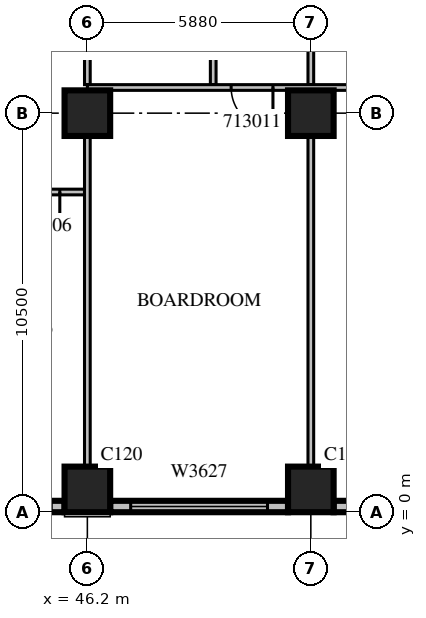
"""IFC4 building model, lengths in metres.
Left out: names, types, materials, properties, quantities, classifications, styles, units other than length and angle.
Written with IfcOpenShell. Run it as: python <this file> out.ifc"""

import sys

from ifc_helpers import new_model, si_unit, direction, frame, frame_2d, origin, origin_2d, place, context, subcontext, project, spatial, rectangle, extrude, source, transform, mapped, element, fill, save


model = new_model("IFC4")
c1 = context("Model", 3, precision=1e-05, world=origin(), true_north=direction((0.0, 1.0)))
c2 = subcontext(c1, "Body", "Model", "MODEL_VIEW")
j1 = project(units=[si_unit("LENGTHUNIT", "METRE"), si_unit("PLANEANGLEUNIT", "RADIAN")], contexts=[c1])
p1 = place(None, origin())
s1 = spatial("IfcSite", under=j1, at=p1, CompositionType="ELEMENT")
p2 = place(p1, origin())
s2 = spatial("IfcBuilding", under=s1, at=p2, CompositionType="ELEMENT")
p3 = place(p2, frame((0.0, 0.0, 65.7)))
s3 = spatial("IfcBuildingStorey", under=s2, at=p3, CompositionType="ELEMENT", Elevation=65.7)
m1 = source(origin(), c2, "Body", "SweptSolid", [
    extrude(rectangle(XDim=1.2, YDim=1.2, at=origin_2d()), origin(), (0.0, 0.0, 1.0), 4.2),
])
for number, where, z_axis, x_axis in (
    (1, (46.2, 0.6, 0.0), (0.0, 0.0, 1.0), (1.0, 0.0, 0.0)),
    (2, (52.08, 0.6, 0.0), (0.0, 0.0, 1.0), (1.0, 0.0, 0.0)),
    (3, (46.2, 10.5, 0.0), (0.0, 0.0, 1.0), (1.0, 0.0, 0.0)),
    (4, (52.08, 10.5, 0.0), (0.0, 0.0, 1.0), (1.0, 0.0, 0.0)),
):
    element("IfcColumn", number, at=place(p3, frame(where, z_axis=z_axis, x_axis=x_axis)), inside=s3, PredefinedType="COLUMN", context=c2, shape_type="MappedRepresentation", body=[
        mapped(m1, transform((0.0, 0.0, 0.0), scale=1.0)),
    ])
m2 = source(origin(), c2, "Body", "SweptSolid", [
    extrude(rectangle(XDim=1.6, YDim=0.3, at=frame_2d((0.8, 0.0))), origin(), (0.0, 0.0, 1.0), 3.8),
])
p4 = place(p3, frame((44.0, 0.15, 0.0), z_axis=(0.0, 0.0, 1.0), x_axis=(1.0, 0.0, 0.0)))
e5 = element("IfcWall", 5, at=p4, inside=s3, PredefinedType="STANDARD", context=c2, shape_type="MappedRepresentation", body=[
    mapped(m2, transform((0.0, 0.0, 0.0), scale=1.0)),
])
m3 = source(origin(), c2, "Body", "SweptSolid", [
    extrude(rectangle(XDim=0.9, YDim=2.7, at=frame_2d((0.45, 1.35))), frame((0.0, 0.16, 0.0), z_axis=(0.0, -1.0, 0.0), x_axis=(1.0, 0.0, 0.0)), (0.0, 0.0, 1.0), 0.32),
])
p5 = place(p4, frame((0.35, 0.0, 0.6)))
e6 = element("IfcOpeningElement", 6, at=p5, cuts=e5, PredefinedType="OPENING", context=c2, shape_type="MappedRepresentation", body=[
    mapped(m3, transform((0.0, 0.0, 0.0), scale=1.0)),
])
m4 = source(origin(), c2, "Body", "SweptSolid", [
    extrude(rectangle(XDim=4.68, YDim=0.3, at=frame_2d((2.34, 0.0))), origin(), (0.0, 0.0, 1.0), 3.8),
])
p6 = place(p3, frame((46.8, 0.15, 0.0), z_axis=(0.0, 0.0, 1.0), x_axis=(1.0, 0.0, 0.0)))
e7 = element("IfcWall", 7, at=p6, inside=s3, PredefinedType="STANDARD", context=c2, shape_type="MappedRepresentation", body=[
    mapped(m4, transform((0.0, 0.0, 0.0), scale=1.0)),
])
m5 = source(origin(), c2, "Body", "SweptSolid", [
    extrude(rectangle(XDim=3.6, YDim=2.7, at=frame_2d((1.8, 1.35))), frame((0.0, 0.16, 0.0), z_axis=(0.0, -1.0, 0.0), x_axis=(1.0, 0.0, 0.0)), (0.0, 0.0, 1.0), 0.32),
])
p7 = place(p6, frame((0.54, 0.0, 0.6)))
e8 = element("IfcOpeningElement", 8, at=p7, cuts=e7, PredefinedType="OPENING", context=c2, shape_type="MappedRepresentation", body=[
    mapped(m5, transform((0.0, 0.0, 0.0), scale=1.0)),
])
p8 = place(p3, frame((52.68, 0.15, 0.0), z_axis=(0.0, 0.0, 1.0), x_axis=(1.0, 0.0, 0.0)))
e9 = element("IfcWall", 9, at=p8, inside=s3, PredefinedType="STANDARD", context=c2, shape_type="MappedRepresentation", body=[
    mapped(m4, transform((0.0, 0.0, 0.0), scale=1.0)),
])
p9 = place(p8, frame((0.54, 0.0, 0.6)))
e10 = element("IfcOpeningElement", 10, at=p9, cuts=e9, PredefinedType="OPENING", context=c2, shape_type="MappedRepresentation", body=[
    mapped(m5, transform((0.0, 0.0, 0.0), scale=1.0)),
])
m6 = source(origin(), c2, "Body", "SweptSolid", [
    extrude(rectangle(XDim=2.2, YDim=0.15, at=frame_2d((1.1, 0.0))), origin(), (0.0, 0.0, 1.0), 3.8),
])
p10 = place(p3, frame((46.125, 8.425, 0.0), z_axis=(0.0, 0.0, 1.0), x_axis=(-1.0, 0.0, 0.0)))
e11 = element("IfcWall", 11, at=p10, inside=s3, PredefinedType="PARTITIONING", context=c2, shape_type="MappedRepresentation", body=[
    mapped(m6, transform((0.0, 0.0, 0.0), scale=1.0)),
])
m7 = source(origin(), c2, "Body", "SweptSolid", [
    extrude(rectangle(XDim=0.9, YDim=2.1, at=frame_2d((0.45, 1.05))), frame((0.0, 0.085, 0.0), z_axis=(0.0, -1.0, 0.0), x_axis=(1.0, 0.0, 0.0)), (0.0, 0.0, 1.0), 0.17),
])
p11 = place(p10, frame((0.65, 0.0, 0.0)))
e12 = element("IfcOpeningElement", 12, at=p11, cuts=e11, PredefinedType="OPENING", context=c2, shape_type="MappedRepresentation", body=[
    mapped(m7, transform((0.0, 0.0, 0.0), scale=1.0)),
])
m8 = source(origin(), c2, "Body", "SweptSolid", [
    extrude(rectangle(XDim=3.75, YDim=0.15, at=frame_2d((1.875, 0.0))), origin(), (0.0, 0.0, 1.0), 3.8),
])
p12 = place(p3, frame((49.512, 11.25, 0.0), z_axis=(0.0, 0.0, 1.0), x_axis=(0.0, 1.0, 0.0)))
e13 = element("IfcWall", 13, at=p12, inside=s3, PredefinedType="PARTITIONING", context=c2, shape_type="MappedRepresentation", body=[
    mapped(m8, transform((0.0, 0.0, 0.0), scale=1.0)),
])
m9 = source(origin(), c2, "Body", "SweptSolid", [
    extrude(rectangle(XDim=8.702, YDim=0.15, at=frame_2d((4.351, 0.0))), origin(), (0.0, 0.0, 1.0), 3.8),
])
p13 = place(p3, frame((46.2, 1.199, 0.0), z_axis=(0.0, 0.0, 1.0), x_axis=(0.0, 1.0, 0.0)))
e14 = element("IfcWall", 14, at=p13, inside=s3, PredefinedType="PARTITIONING", context=c2, shape_type="MappedRepresentation", body=[
    mapped(m9, transform((0.0, 0.0, 0.0), scale=1.0)),
])
p14 = place(p3, frame((46.2, 11.25, 0.0), z_axis=(0.0, 0.0, 1.0), x_axis=(0.0, 1.0, 0.0)))
e15 = element("IfcWall", 15, at=p14, inside=s3, PredefinedType="PARTITIONING", context=c2, shape_type="MappedRepresentation", body=[
    mapped(m8, transform((0.0, 0.0, 0.0), scale=1.0)),
])
p15 = place(p3, frame((52.08, 1.199, 0.0), z_axis=(0.0, 0.0, 1.0), x_axis=(0.0, 1.0, 0.0)))
e16 = element("IfcWall", 16, at=p15, inside=s3, PredefinedType="PARTITIONING", context=c2, shape_type="MappedRepresentation", body=[
    mapped(m9, transform((0.0, 0.0, 0.0), scale=1.0)),
])
p16 = place(p3, frame((52.08, 11.25, 0.0), z_axis=(0.0, 0.0, 1.0), x_axis=(0.0, 1.0, 0.0)))
e17 = element("IfcWall", 17, at=p16, inside=s3, PredefinedType="PARTITIONING", context=c2, shape_type="MappedRepresentation", body=[
    mapped(m8, transform((0.0, 0.0, 0.0), scale=1.0)),
])
m10 = source(origin(), c2, "Body", "SweptSolid", [
    extrude(rectangle(XDim=24.9, YDim=0.15, at=frame_2d((12.45, 0.0))), origin(), (0.0, 0.0, 1.0), 3.8),
])
p17 = place(p3, frame((71.1, 11.175, 0.0), z_axis=(0.0, 0.0, 1.0), x_axis=(-1.0, 0.0, 0.0)))
e18 = element("IfcWall", 18, at=p17, inside=s3, PredefinedType="PARTITIONING", context=c2, shape_type="MappedRepresentation", body=[
    mapped(m10, transform((0.0, 0.0, 0.0), scale=1.0)),
])
m11 = source(origin(), c2, "Body", "SweptSolid", [
    extrude(rectangle(XDim=1.1, YDim=2.1, at=frame_2d((0.55, 1.05))), frame((0.0, 0.085, 0.0), z_axis=(0.0, -1.0, 0.0), x_axis=(1.0, 0.0, 0.0)), (0.0, 0.0, 1.0), 0.17),
])
p18 = place(p17, frame((20.017, 0.0, 0.0)))
e19 = element("IfcOpeningElement", 19, at=p18, cuts=e18, PredefinedType="OPENING", context=c2, shape_type="MappedRepresentation", body=[
    mapped(m11, transform((0.0, 0.0, 0.0), scale=1.0)),
])
p19 = place(p17, frame((16.481, 0.0, 0.0)))
e20 = element("IfcOpeningElement", 20, at=p19, cuts=e18, PredefinedType="OPENING", context=c2, shape_type="MappedRepresentation", body=[
    mapped(m11, transform((0.0, 0.0, 0.0), scale=1.0)),
])
p20 = place(p17, frame((4.607, 0.0, 0.0)))
e21 = element("IfcOpeningElement", 21, at=p20, cuts=e18, PredefinedType="OPENING", context=c2, shape_type="MappedRepresentation", body=[
    mapped(m7, transform((0.0, 0.0, 0.0), scale=1.0)),
])
p21 = place(p17, frame((2.243, 0.0, 0.0)))
e22 = element("IfcOpeningElement", 22, at=p21, cuts=e18, PredefinedType="OPENING", context=c2, shape_type="MappedRepresentation", body=[
    mapped(m7, transform((0.0, 0.0, 0.0), scale=1.0)),
])
m12 = source(origin(), c2, "Body", "SweptSolid", [
    extrude(rectangle(XDim=3.6, YDim=2.7, at=frame_2d((1.8, 1.35))), frame((0.0, 0.03, 0.0), z_axis=(0.0, -1.0, 0.0), x_axis=(1.0, 0.0, 0.0)), (0.0, 0.0, 1.0), 0.06),
])
p22 = place(p7, origin())
e23 = element("IfcWindow", 23, at=p22, inside=s3, PartitioningType="SINGLE_PANEL", PredefinedType="WINDOW", context=c2, shape_type="MappedRepresentation", body=[
    mapped(m12, transform((0.0, 0.0, 0.0), scale=1.0)),
])
fill(e8, e23)
m13 = source(origin(), c2, "Body", "SweptSolid", [
    extrude(rectangle(XDim=0.9, YDim=2.1, at=frame_2d((0.45, 1.05))), frame((0.0, 0.025, 0.0), z_axis=(0.0, -1.0, 0.0), x_axis=(1.0, 0.0, 0.0)), (0.0, 0.0, 1.0), 0.05),
])
p23 = place(p11, origin())
e24 = element("IfcDoor", 24, at=p23, inside=s3, OperationType="SINGLE_SWING_LEFT", PredefinedType="DOOR", context=c2, shape_type="MappedRepresentation", body=[
    mapped(m13, transform((0.0, 0.0, 0.0), scale=1.0)),
])
fill(e12, e24)
m14 = source(origin(), c2, "Body", "SweptSolid", [
    extrude(rectangle(XDim=1.1, YDim=2.1, at=frame_2d((0.55, 1.05))), frame((0.0, 0.025, 0.0), z_axis=(0.0, -1.0, 0.0), x_axis=(1.0, 0.0, 0.0)), (0.0, 0.0, 1.0), 0.05),
])
p24 = place(p18, origin())
e25 = element("IfcDoor", 25, at=p24, inside=s3, OperationType="SINGLE_SWING_LEFT", PredefinedType="DOOR", context=c2, shape_type="MappedRepresentation", body=[
    mapped(m14, transform((0.0, 0.0, 0.0), scale=1.0)),
])
fill(e19, e25)
save(model, sys.argv[1])
